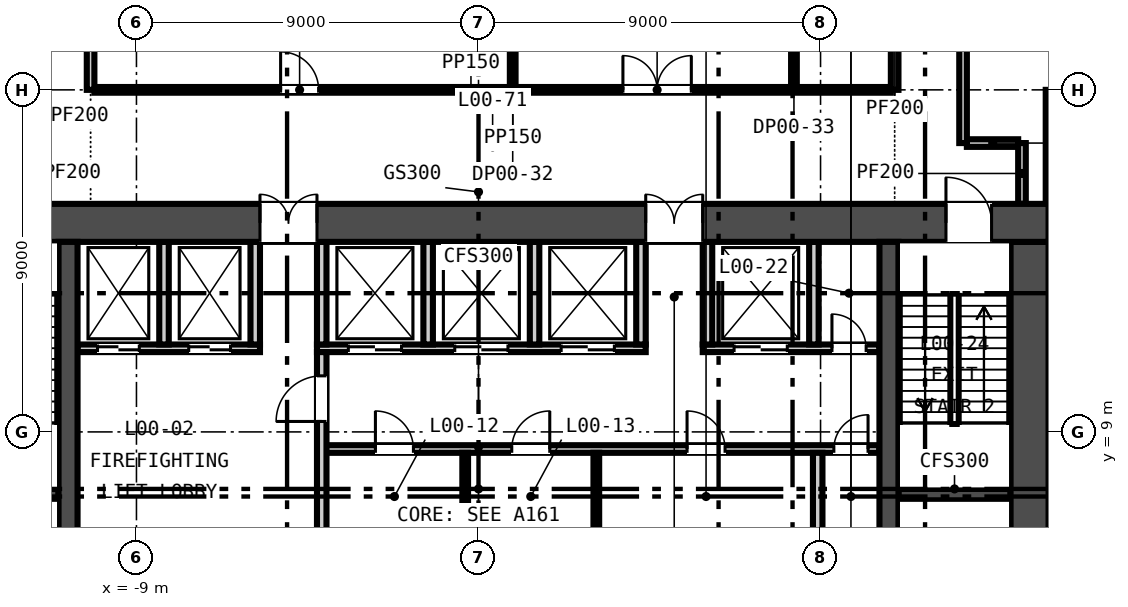
"""IFC4 building model, lengths in metres.
Left out: names, types, materials, properties, quantities, classifications, styles, units other than length and angle.
Written with IfcOpenShell. Run it as: python <this file> out.ifc"""

import sys

from ifc_helpers import new_model, si_unit, direction, frame, frame_2d, origin, place, context, subcontext, project, spatial, rectangle, extrude, element, fill, save


model = new_model("IFC4")
c1 = context("Model", 3, precision=1e-05, world=origin(), true_north=direction((0.0, 1.0)))
c2 = subcontext(c1, "Body", "Model", "MODEL_VIEW")
j1 = project(units=[si_unit("LENGTHUNIT", "METRE"), si_unit("PLANEANGLEUNIT", "RADIAN")], contexts=[c1])
p1 = place(None, origin())
s1 = spatial("IfcSite", under=j1, at=p1, CompositionType="ELEMENT")
p2 = place(p1, origin())
s2 = spatial("IfcBuilding", under=s1, at=p2, CompositionType="ELEMENT")
p3 = place(p2, origin())
s3 = spatial("IfcBuildingStorey", under=s2, at=p3, CompositionType="ELEMENT", Elevation=0.0)
p4 = place(p3, frame((-15.0, 14.5, -2.2), z_axis=(0.0, 0.0, 1.0), x_axis=(1.0, 0.0, 0.0)))
e1 = element("IfcWall", 1, at=p4, inside=s3, PredefinedType="SOLIDWALL", context=c2, shape_type="SweptSolid", body=[
    extrude(rectangle(XDim=30.0, YDim=1.0, at=frame_2d((15.0, 0.0))), origin(), (0.0, 0.0, 1.0), 10.8),
])
p5 = place(p4, frame((9.25, 0.0, 2.2)))
e2 = element("IfcOpeningElement", 2, at=p5, cuts=e1, PredefinedType="OPENING", context=c2, shape_type="SweptSolid", body=[
    extrude(rectangle(XDim=1.5, YDim=2.1, at=frame_2d((0.75, 1.05))), frame((0.0, 0.51, 0.0), z_axis=(0.0, -1.0, 0.0), x_axis=(1.0, 0.0, 0.0)), (0.0, 0.0, 1.0), 1.02),
])
p6 = place(p4, frame((19.4, 0.0, 2.2)))
e3 = element("IfcOpeningElement", 3, at=p6, cuts=e1, PredefinedType="OPENING", context=c2, shape_type="SweptSolid", body=[
    extrude(rectangle(XDim=1.5, YDim=2.1, at=frame_2d((0.75, 1.05))), frame((0.0, 0.51, 0.0), z_axis=(0.0, -1.0, 0.0), x_axis=(1.0, 0.0, 0.0)), (0.0, 0.0, 1.0), 1.02),
])
p7 = place(p4, frame((1.5, 0.0, 2.2)))
e4 = element("IfcOpeningElement", 4, at=p7, cuts=e1, PredefinedType="OPENING", context=c2, shape_type="SweptSolid", body=[
    extrude(rectangle(XDim=1.2, YDim=2.1, at=frame_2d((0.6, 1.05))), frame((0.0, 0.51, 0.0), z_axis=(0.0, -1.0, 0.0), x_axis=(1.0, 0.0, 0.0)), (0.0, 0.0, 1.0), 1.02),
])
p8 = place(p4, frame((27.3, 0.0, 2.2)))
e5 = element("IfcOpeningElement", 5, at=p8, cuts=e1, PredefinedType="OPENING", context=c2, shape_type="SweptSolid", body=[
    extrude(rectangle(XDim=1.2, YDim=2.1, at=frame_2d((0.6, 1.05))), frame((0.0, 0.51, 0.0), z_axis=(0.0, -1.0, 0.0), x_axis=(1.0, 0.0, 0.0)), (0.0, 0.0, 1.0), 1.02),
])
p9 = place(p3, frame((14.5, 1.0, -2.2), z_axis=(0.0, 0.0, 1.0), x_axis=(0.0, 1.0, 0.0)))
e6 = element("IfcWall", 6, at=p9, inside=s3, PredefinedType="SOLIDWALL", context=c2, shape_type="SweptSolid", body=[
    extrude(rectangle(XDim=13.0, YDim=1.0, at=frame_2d((6.5, 0.0))), origin(), (0.0, 0.0, 1.0), 10.8),
])
for number, where, z_axis, x_axis in (
    (7, (-10.8, 1.0, -2.2), (0.0, 0.0, 1.0), (0.0, 1.0, 0.0)),
    (8, (10.8, 1.0, -2.2), (0.0, 0.0, 1.0), (0.0, 1.0, 0.0)),
):
    element("IfcWall", number, at=place(p3, frame(where, z_axis=z_axis, x_axis=x_axis)), inside=s3, PredefinedType="SOLIDWALL", context=c2, shape_type="SweptSolid", body=[
        extrude(rectangle(XDim=13.0, YDim=0.5, at=frame_2d((6.5, 0.0))), origin(), (0.0, 0.0, 1.0), 10.8),
    ])
p10 = place(p3, frame((-4.125, 8.55, 0.0), z_axis=(0.0, 0.0, 1.0), x_axis=(1.0, 0.0, 0.0)))
e9 = element("IfcWall", 9, at=p10, inside=s3, PredefinedType="PARTITIONING", context=c2, shape_type="SweptSolid", body=[
    extrude(rectangle(XDim=14.675, YDim=0.2, at=frame_2d((7.337, 0.0))), origin(), (0.0, 0.0, 1.0), 8.6),
])
p11 = place(p10, frame((1.413, 0.0, 0.0)))
e10 = element("IfcOpeningElement", 10, at=p11, cuts=e9, PredefinedType="OPENING", context=c2, shape_type="SweptSolid", body=[
    extrude(rectangle(XDim=1.0, YDim=2.1, at=frame_2d((0.5, 1.05))), frame((0.0, 0.11, 0.0), z_axis=(0.0, -1.0, 0.0), x_axis=(1.0, 0.0, 0.0)), (0.0, 0.0, 1.0), 0.22),
])
p12 = place(p10, frame((5.0, 0.0, 0.0)))
e11 = element("IfcOpeningElement", 11, at=p12, cuts=e9, PredefinedType="OPENING", context=c2, shape_type="SweptSolid", body=[
    extrude(rectangle(XDim=1.0, YDim=2.1, at=frame_2d((0.5, 1.05))), frame((0.0, 0.11, 0.0), z_axis=(0.0, -1.0, 0.0), x_axis=(1.0, 0.0, 0.0)), (0.0, 0.0, 1.0), 0.22),
])
p13 = place(p10, frame((9.613, 0.0, 0.0)))
e12 = element("IfcOpeningElement", 12, at=p13, cuts=e9, PredefinedType="OPENING", context=c2, shape_type="SweptSolid", body=[
    extrude(rectangle(XDim=1.0, YDim=2.1, at=frame_2d((0.5, 1.05))), frame((0.0, 0.11, 0.0), z_axis=(0.0, -1.0, 0.0), x_axis=(1.0, 0.0, 0.0)), (0.0, 0.0, 1.0), 0.22),
])
p14 = place(p10, frame((13.475, 0.0, 0.0)))
e13 = element("IfcOpeningElement", 13, at=p14, cuts=e9, PredefinedType="OPENING", context=c2, shape_type="SweptSolid", body=[
    extrude(rectangle(XDim=0.9, YDim=2.1, at=frame_2d((0.45, 1.05))), frame((0.0, 0.11, 0.0), z_axis=(0.0, -1.0, 0.0), x_axis=(1.0, 0.0, 0.0)), (0.0, 0.0, 1.0), 0.22),
])
p15 = place(p3, frame((-10.55, 11.2, 0.0), z_axis=(0.0, 0.0, 1.0), x_axis=(1.0, 0.0, 0.0)))
e14 = element("IfcWall", 14, at=p15, inside=s3, PredefinedType="PARTITIONING", context=c2, shape_type="SweptSolid", body=[
    extrude(rectangle(XDim=4.8, YDim=0.2, at=frame_2d((2.4, 0.0))), origin(), (0.0, 0.0, 1.0), 8.6),
])
p16 = place(p15, frame((0.525, 0.0, 0.0)))
e15 = element("IfcOpeningElement", 15, at=p16, cuts=e14, PredefinedType="OPENING", context=c2, shape_type="SweptSolid", body=[
    extrude(rectangle(XDim=1.1, YDim=2.1, at=frame_2d((0.55, 1.05))), frame((0.0, 0.11, 0.0), z_axis=(0.0, -1.0, 0.0), x_axis=(1.0, 0.0, 0.0)), (0.0, 0.0, 1.0), 0.22),
])
p17 = place(p15, frame((2.925, 0.0, 0.0)))
e16 = element("IfcOpeningElement", 16, at=p17, cuts=e14, PredefinedType="OPENING", context=c2, shape_type="SweptSolid", body=[
    extrude(rectangle(XDim=1.1, YDim=2.1, at=frame_2d((0.55, 1.05))), frame((0.0, 0.11, 0.0), z_axis=(0.0, -1.0, 0.0), x_axis=(1.0, 0.0, 0.0)), (0.0, 0.0, 1.0), 0.22),
])
p18 = place(p3, frame((-4.25, 11.2, 0.0), z_axis=(0.0, 0.0, 1.0), x_axis=(1.0, 0.0, 0.0)))
e17 = element("IfcWall", 17, at=p18, inside=s3, PredefinedType="PARTITIONING", context=c2, shape_type="SweptSolid", body=[
    extrude(rectangle(XDim=8.65, YDim=0.2, at=frame_2d((4.325, 0.0))), origin(), (0.0, 0.0, 1.0), 8.6),
])
p19 = place(p18, frame((0.825, 0.0, 0.0)))
e18 = element("IfcOpeningElement", 18, at=p19, cuts=e17, PredefinedType="OPENING", context=c2, shape_type="SweptSolid", body=[
    extrude(rectangle(XDim=1.4, YDim=2.1, at=frame_2d((0.7, 1.05))), frame((0.0, 0.11, 0.0), z_axis=(0.0, -1.0, 0.0), x_axis=(1.0, 0.0, 0.0)), (0.0, 0.0, 1.0), 0.22),
])
p20 = place(p18, frame((3.625, 0.0, 0.0)))
e19 = element("IfcOpeningElement", 19, at=p20, cuts=e17, PredefinedType="OPENING", context=c2, shape_type="SweptSolid", body=[
    extrude(rectangle(XDim=1.4, YDim=2.1, at=frame_2d((0.7, 1.05))), frame((0.0, 0.11, 0.0), z_axis=(0.0, -1.0, 0.0), x_axis=(1.0, 0.0, 0.0)), (0.0, 0.0, 1.0), 0.22),
])
p21 = place(p18, frame((6.425, 0.0, 0.0)))
e20 = element("IfcOpeningElement", 20, at=p21, cuts=e17, PredefinedType="OPENING", context=c2, shape_type="SweptSolid", body=[
    extrude(rectangle(XDim=1.4, YDim=2.1, at=frame_2d((0.7, 1.05))), frame((0.0, 0.11, 0.0), z_axis=(0.0, -1.0, 0.0), x_axis=(1.0, 0.0, 0.0)), (0.0, 0.0, 1.0), 0.22),
])
p22 = place(p3, frame((5.9, 11.2, 0.0), z_axis=(0.0, 0.0, 1.0), x_axis=(1.0, 0.0, 0.0)))
e21 = element("IfcWall", 21, at=p22, inside=s3, PredefinedType="PARTITIONING", context=c2, shape_type="SweptSolid", body=[
    extrude(rectangle(XDim=4.65, YDim=0.2, at=frame_2d((2.325, 0.0))), origin(), (0.0, 0.0, 1.0), 8.6),
])
p23 = place(p22, frame((0.825, 0.0, 0.0)))
e22 = element("IfcOpeningElement", 22, at=p23, cuts=e21, PredefinedType="OPENING", context=c2, shape_type="SweptSolid", body=[
    extrude(rectangle(XDim=1.4, YDim=2.1, at=frame_2d((0.7, 1.05))), frame((0.0, 0.11, 0.0), z_axis=(0.0, -1.0, 0.0), x_axis=(1.0, 0.0, 0.0)), (0.0, 0.0, 1.0), 0.22),
])
p24 = place(p22, frame((3.4, 0.0, 0.0)))
e23 = element("IfcOpeningElement", 23, at=p24, cuts=e21, PredefinedType="OPENING", context=c2, shape_type="SweptSolid", body=[
    extrude(rectangle(XDim=0.9, YDim=2.1, at=frame_2d((0.45, 1.05))), frame((0.0, 0.11, 0.0), z_axis=(0.0, -1.0, 0.0), x_axis=(1.0, 0.0, 0.0)), (0.0, 0.0, 1.0), 0.22),
])
p25 = place(p3, frame((-4.125, 6.15, 0.0), z_axis=(0.0, 0.0, 1.0), x_axis=(0.0, 1.0, 0.0)))
e24 = element("IfcWall", 24, at=p25, inside=s3, PredefinedType="PARTITIONING", context=c2, shape_type="SweptSolid", body=[
    extrude(rectangle(XDim=4.95, YDim=0.25, at=frame_2d((2.475, 0.0))), origin(), (0.0, 0.0, 1.0), 8.6),
])
p26 = place(p25, frame((3.125, 0.0, 0.0)))
e25 = element("IfcOpeningElement", 25, at=p26, cuts=e24, PredefinedType="OPENING", context=c2, shape_type="SweptSolid", body=[
    extrude(rectangle(XDim=1.2, YDim=2.1, at=frame_2d((0.6, 1.05))), frame((0.0, 0.135, 0.0), z_axis=(0.0, -1.0, 0.0), x_axis=(1.0, 0.0, 0.0)), (0.0, 0.0, 1.0), 0.27),
])
for number, where, z_axis, x_axis in (
    (26, (-0.35, 6.15, 0.0), (0.0, 0.0, 1.0), (0.0, 1.0, 0.0)),
    (27, (3.1, 6.15, 0.0), (0.0, 0.0, 1.0), (0.0, 1.0, 0.0)),
):
    element("IfcWall", number, at=place(p3, frame(where, z_axis=z_axis, x_axis=x_axis)), inside=s3, PredefinedType="PARTITIONING", context=c2, shape_type="SweptSolid", body=[
        extrude(rectangle(XDim=2.3, YDim=0.15, at=frame_2d((1.15, 0.0))), origin(), (0.0, 0.0, 1.0), 8.6),
    ])
p27 = place(p3, frame((8.925, 6.15, 0.0), z_axis=(0.0, 0.0, 1.0), x_axis=(0.0, 1.0, 0.0)))
e28 = element("IfcWall", 28, at=p27, inside=s3, PredefinedType="PARTITIONING", context=c2, shape_type="SweptSolid", body=[
    extrude(rectangle(XDim=2.3, YDim=0.25, at=frame_2d((1.15, 0.0))), origin(), (0.0, 0.0, 1.0), 8.6),
])
for number, where, z_axis, x_axis in (
    (29, (-8.275, 11.3, 0.0), (0.0, 0.0, 1.0), (0.0, 1.0, 0.0)),
    (30, (-5.875, 11.3, 0.0), (0.0, 0.0, 1.0), (0.0, 1.0, 0.0)),
    (31, (-4.125, 11.3, 0.0), (0.0, 0.0, 1.0), (0.0, 1.0, 0.0)),
    (32, (-1.325, 11.3, 0.0), (0.0, 0.0, 1.0), (0.0, 1.0, 0.0)),
    (33, (1.475, 11.3, 0.0), (0.0, 0.0, 1.0), (0.0, 1.0, 0.0)),
    (34, (4.275, 11.3, 0.0), (0.0, 0.0, 1.0), (0.0, 1.0, 0.0)),
    (35, (6.025, 11.3, 0.0), (0.0, 0.0, 1.0), (0.0, 1.0, 0.0)),
    (36, (8.825, 11.3, 0.0), (0.0, 0.0, 1.0), (0.0, 1.0, 0.0)),
):
    element("IfcWall", number, at=place(p3, frame(where, z_axis=z_axis, x_axis=x_axis)), inside=s3, PredefinedType="PARTITIONING", context=c2, shape_type="SweptSolid", body=[
        extrude(rectangle(XDim=2.7, YDim=0.25, at=frame_2d((1.35, 0.0))), origin(), (0.0, 0.0, 1.0), 8.6),
    ])
for number, where, z_axis, x_axis in (
    (37, (-14.0, 7.35, 0.0), (0.0, 0.0, 1.0), (1.0, 0.0, 0.0)),
    (38, (11.05, 7.35, 0.0), (0.0, 0.0, 1.0), (1.0, 0.0, 0.0)),
):
    element("IfcWall", number, at=place(p3, frame(where, z_axis=z_axis, x_axis=x_axis)), inside=s3, PredefinedType="SOLIDWALL", context=c2, shape_type="SweptSolid", body=[
        extrude(rectangle(XDim=2.95, YDim=0.3, at=frame_2d((1.475, 0.0))), origin(), (0.0, 0.0, 1.0), 8.6),
    ])
p28 = place(p3, frame((12.85, 16.6, 0.0), z_axis=(0.0, 0.0, 1.0), x_axis=(1.0, 0.0, 0.0)))
e39 = element("IfcWall", 39, at=p28, inside=s3, PredefinedType="PARTITIONING", context=c2, shape_type="SweptSolid", body=[
    extrude(rectangle(XDim=1.35, YDim=0.2, at=frame_2d((0.675, 0.0))), origin(), (0.0, 0.0, 1.0), 8.6),
])
p29 = place(p3, frame((-10.107, 18.0, 0.0), z_axis=(0.0, 0.0, 1.0), x_axis=(1.0, 0.0, 0.0)))
e40 = element("IfcWall", 40, at=p29, inside=s3, PredefinedType="PARTITIONING", context=c2, shape_type="SweptSolid", body=[
    extrude(rectangle(XDim=20.957, YDim=0.15, at=frame_2d((10.479, 0.0))), origin(), (0.0, 0.0, 1.0), 8.6),
])
p30 = place(p29, frame((13.907, 0.0, 0.0)))
e41 = element("IfcOpeningElement", 41, at=p30, cuts=e40, PredefinedType="OPENING", context=c2, shape_type="SweptSolid", body=[
    extrude(rectangle(XDim=1.8, YDim=2.4, at=frame_2d((0.9, 1.2))), frame((0.0, 0.085, 0.0), z_axis=(0.0, -1.0, 0.0), x_axis=(1.0, 0.0, 0.0)), (0.0, 0.0, 1.0), 0.17),
])
p31 = place(p29, frame((4.9, 0.0, 0.0)))
e42 = element("IfcOpeningElement", 42, at=p31, cuts=e40, PredefinedType="OPENING", context=c2, shape_type="SweptSolid", body=[
    extrude(rectangle(XDim=1.0, YDim=2.1, at=frame_2d((0.5, 1.05))), frame((0.0, 0.085, 0.0), z_axis=(0.0, -1.0, 0.0), x_axis=(1.0, 0.0, 0.0)), (0.0, 0.0, 1.0), 0.17),
])
p32 = place(p3, frame((-10.207, 18.0, 0.0), z_axis=(0.0, 0.0, 1.0), x_axis=(0.0, 1.0, 0.0)))
e43 = element("IfcWall", 43, at=p32, inside=s3, PredefinedType="PARTITIONING", context=c2, shape_type="SweptSolid", body=[
    extrude(rectangle(XDim=13.1, YDim=0.2, at=frame_2d((6.55, 0.0))), origin(), (0.0, 0.0, 1.0), 8.6),
])
p33 = place(p3, frame((0.9, 18.075, 0.0), z_axis=(0.0, 0.0, 1.0), x_axis=(0.0, 1.0, 0.0)))
e44 = element("IfcWall", 44, at=p33, inside=s3, PredefinedType="PARTITIONING", context=c2, shape_type="SweptSolid", body=[
    extrude(rectangle(XDim=10.925, YDim=0.15, at=frame_2d((5.462, 0.0))), origin(), (0.0, 0.0, 1.0), 8.6),
])
p34 = place(p3, frame((8.3, 18.075, 0.0), z_axis=(0.0, 0.0, 1.0), x_axis=(0.0, 1.0, 0.0)))
e45 = element("IfcWall", 45, at=p34, inside=s3, PredefinedType="PARTITIONING", context=c2, shape_type="SweptSolid", body=[
    extrude(rectangle(XDim=13.025, YDim=0.15, at=frame_2d((6.513, 0.0))), origin(), (0.0, 0.0, 1.0), 8.6),
])
p35 = place(p3, frame((10.95, 18.0, 0.0), z_axis=(0.0, 0.0, 1.0), x_axis=(0.0, 1.0, 0.0)))
e46 = element("IfcWall", 46, at=p35, inside=s3, PredefinedType="PARTITIONING", context=c2, shape_type="SweptSolid", body=[
    extrude(rectangle(XDim=8.973, YDim=0.2, at=frame_2d((4.486, 0.0))), origin(), (0.0, 0.0, 1.0), 7.921),
])
p36 = place(p3, frame((12.75, 16.6, 0.0), z_axis=(0.0, 0.0, 1.0), x_axis=(0.0, 1.0, 0.0)))
e47 = element("IfcWall", 47, at=p36, inside=s3, PredefinedType="PARTITIONING", context=c2, shape_type="SweptSolid", body=[
    extrude(rectangle(XDim=9.65, YDim=0.2, at=frame_2d((4.825, 0.0))), origin(), (0.0, 0.0, 1.0), 8.6),
])
p37 = place(p3, frame((14.3, 15.0, 0.0), z_axis=(0.0, 0.0, 1.0), x_axis=(0.0, 1.0, 0.0)))
e48 = element("IfcWall", 48, at=p37, inside=s3, PredefinedType="PARTITIONING", context=c2, shape_type="SweptSolid", body=[
    extrude(rectangle(XDim=1.6, YDim=0.2, at=frame_2d((0.8, 0.0))), origin(), (0.0, 0.0, 1.0), 8.6),
])
p38 = place(p3, frame((15.0, 15.0, 0.0), z_axis=(0.0, 0.0, 1.0), x_axis=(0.0, 1.0, 0.0)))
e49 = element("IfcWall", 49, at=p38, inside=s3, PredefinedType="PARTITIONING", context=c2, shape_type="SweptSolid", body=[
    extrude(rectangle(XDim=3.0, YDim=0.15, at=frame_2d((1.5, 0.0))), origin(), (0.0, 0.0, 1.0), 8.6),
])
p39 = place(p26, origin())
e50 = element("IfcDoor", 50, at=p39, inside=s3, OperationType="SINGLE_SWING_LEFT", PredefinedType="DOOR", context=c2, shape_type="SweptSolid", body=[
    extrude(rectangle(XDim=1.2, YDim=2.1, at=frame_2d((0.6, 1.05))), frame((0.0, 0.025, 0.0), z_axis=(0.0, -1.0, 0.0), x_axis=(1.0, 0.0, 0.0)), (0.0, 0.0, 1.0), 0.05),
])
fill(e25, e50)
p40 = place(p11, origin())
e51 = element("IfcDoor", 51, at=p40, inside=s3, OperationType="SINGLE_SWING_LEFT", PredefinedType="DOOR", context=c2, shape_type="SweptSolid", body=[
    extrude(rectangle(XDim=1.0, YDim=2.1, at=frame_2d((0.5, 1.05))), frame((0.0, 0.025, 0.0), z_axis=(0.0, -1.0, 0.0), x_axis=(1.0, 0.0, 0.0)), (0.0, 0.0, 1.0), 0.05),
])
fill(e10, e51)
p41 = place(p12, origin())
e52 = element("IfcDoor", 52, at=p41, inside=s3, OperationType="SINGLE_SWING_RIGHT", PredefinedType="DOOR", context=c2, shape_type="SweptSolid", body=[
    extrude(rectangle(XDim=1.0, YDim=2.1, at=frame_2d((0.5, 1.05))), frame((0.0, 0.025, 0.0), z_axis=(0.0, -1.0, 0.0), x_axis=(1.0, 0.0, 0.0)), (0.0, 0.0, 1.0), 0.05),
])
fill(e11, e52)
p42 = place(p13, origin())
e53 = element("IfcDoor", 53, at=p42, inside=s3, OperationType="SINGLE_SWING_LEFT", PredefinedType="DOOR", context=c2, shape_type="SweptSolid", body=[
    extrude(rectangle(XDim=1.0, YDim=2.1, at=frame_2d((0.5, 1.05))), frame((0.0, 0.025, 0.0), z_axis=(0.0, -1.0, 0.0), x_axis=(1.0, 0.0, 0.0)), (0.0, 0.0, 1.0), 0.05),
])
fill(e12, e53)
p43 = place(p14, origin())
e54 = element("IfcDoor", 54, at=p43, inside=s3, OperationType="SINGLE_SWING_RIGHT", PredefinedType="DOOR", context=c2, shape_type="SweptSolid", body=[
    extrude(rectangle(XDim=0.9, YDim=2.1, at=frame_2d((0.45, 1.05))), frame((0.0, 0.025, 0.0), z_axis=(0.0, -1.0, 0.0), x_axis=(1.0, 0.0, 0.0)), (0.0, 0.0, 1.0), 0.05),
])
fill(e13, e54)
p44 = place(p16, origin())
e55 = element("IfcDoor", 55, at=p44, inside=s3, OperationType="DOUBLE_DOOR_SLIDING", PredefinedType="DOOR", context=c2, shape_type="SweptSolid", body=[
    extrude(rectangle(XDim=1.1, YDim=2.1, at=frame_2d((0.55, 1.05))), frame((0.0, 0.025, 0.0), z_axis=(0.0, -1.0, 0.0), x_axis=(1.0, 0.0, 0.0)), (0.0, 0.0, 1.0), 0.05),
])
fill(e15, e55)
p45 = place(p17, origin())
e56 = element("IfcDoor", 56, at=p45, inside=s3, OperationType="DOUBLE_DOOR_SLIDING", PredefinedType="DOOR", context=c2, shape_type="SweptSolid", body=[
    extrude(rectangle(XDim=1.1, YDim=2.1, at=frame_2d((0.55, 1.05))), frame((0.0, 0.025, 0.0), z_axis=(0.0, -1.0, 0.0), x_axis=(1.0, 0.0, 0.0)), (0.0, 0.0, 1.0), 0.05),
])
fill(e16, e56)
p46 = place(p19, origin())
e57 = element("IfcDoor", 57, at=p46, inside=s3, OperationType="DOUBLE_DOOR_SLIDING", PredefinedType="DOOR", context=c2, shape_type="SweptSolid", body=[
    extrude(rectangle(XDim=1.4, YDim=2.1, at=frame_2d((0.7, 1.05))), frame((0.0, 0.025, 0.0), z_axis=(0.0, -1.0, 0.0), x_axis=(1.0, 0.0, 0.0)), (0.0, 0.0, 1.0), 0.05),
])
fill(e18, e57)
p47 = place(p20, origin())
e58 = element("IfcDoor", 58, at=p47, inside=s3, OperationType="DOUBLE_DOOR_SLIDING", PredefinedType="DOOR", context=c2, shape_type="SweptSolid", body=[
    extrude(rectangle(XDim=1.4, YDim=2.1, at=frame_2d((0.7, 1.05))), frame((0.0, 0.025, 0.0), z_axis=(0.0, -1.0, 0.0), x_axis=(1.0, 0.0, 0.0)), (0.0, 0.0, 1.0), 0.05),
])
fill(e19, e58)
p48 = place(p21, origin())
e59 = element("IfcDoor", 59, at=p48, inside=s3, OperationType="DOUBLE_DOOR_SLIDING", PredefinedType="DOOR", context=c2, shape_type="SweptSolid", body=[
    extrude(rectangle(XDim=1.4, YDim=2.1, at=frame_2d((0.7, 1.05))), frame((0.0, 0.025, 0.0), z_axis=(0.0, -1.0, 0.0), x_axis=(1.0, 0.0, 0.0)), (0.0, 0.0, 1.0), 0.05),
])
fill(e20, e59)
p49 = place(p23, origin())
e60 = element("IfcDoor", 60, at=p49, inside=s3, OperationType="DOUBLE_DOOR_SLIDING", PredefinedType="DOOR", context=c2, shape_type="SweptSolid", body=[
    extrude(rectangle(XDim=1.4, YDim=2.1, at=frame_2d((0.7, 1.05))), frame((0.0, 0.025, 0.0), z_axis=(0.0, -1.0, 0.0), x_axis=(1.0, 0.0, 0.0)), (0.0, 0.0, 1.0), 0.05),
])
fill(e22, e60)
p50 = place(p24, origin())
e61 = element("IfcDoor", 61, at=p50, inside=s3, OperationType="SINGLE_SWING_LEFT", PredefinedType="DOOR", context=c2, shape_type="SweptSolid", body=[
    extrude(rectangle(XDim=0.9, YDim=2.1, at=frame_2d((0.45, 1.05))), frame((0.0, 0.025, 0.0), z_axis=(0.0, -1.0, 0.0), x_axis=(1.0, 0.0, 0.0)), (0.0, 0.0, 1.0), 0.05),
])
fill(e23, e61)
p51 = place(p5, origin())
e62 = element("IfcDoor", 62, at=p51, inside=s3, OperationType="DOUBLE_DOOR_SINGLE_SWING", PredefinedType="DOOR", context=c2, shape_type="SweptSolid", body=[
    extrude(rectangle(XDim=1.5, YDim=2.1, at=frame_2d((0.75, 1.05))), frame((0.0, 0.025, 0.0), z_axis=(0.0, -1.0, 0.0), x_axis=(1.0, 0.0, 0.0)), (0.0, 0.0, 1.0), 0.05),
])
fill(e2, e62)
p52 = place(p6, origin())
e63 = element("IfcDoor", 63, at=p52, inside=s3, OperationType="DOUBLE_DOOR_SINGLE_SWING", PredefinedType="DOOR", context=c2, shape_type="SweptSolid", body=[
    extrude(rectangle(XDim=1.5, YDim=2.1, at=frame_2d((0.75, 1.05))), frame((0.0, 0.025, 0.0), z_axis=(0.0, -1.0, 0.0), x_axis=(1.0, 0.0, 0.0)), (0.0, 0.0, 1.0), 0.05),
])
fill(e3, e63)
p53 = place(p8, origin())
e64 = element("IfcDoor", 64, at=p53, inside=s3, OperationType="SINGLE_SWING_LEFT", PredefinedType="DOOR", context=c2, shape_type="SweptSolid", body=[
    extrude(rectangle(XDim=1.2, YDim=2.1, at=frame_2d((0.6, 1.05))), frame((0.0, 0.025, 0.0), z_axis=(0.0, -1.0, 0.0), x_axis=(1.0, 0.0, 0.0)), (0.0, 0.0, 1.0), 0.05),
])
fill(e5, e64)
p54 = place(p30, origin())
e65 = element("IfcDoor", 65, at=p54, inside=s3, OperationType="SINGLE_SWING_LEFT", PredefinedType="DOOR", context=c2, shape_type="SweptSolid", body=[
    extrude(rectangle(XDim=1.8, YDim=2.4, at=frame_2d((0.9, 1.2))), frame((0.0, 0.025, 0.0), z_axis=(0.0, -1.0, 0.0), x_axis=(1.0, 0.0, 0.0)), (0.0, 0.0, 1.0), 0.05),
])
fill(e41, e65)
p55 = place(p31, origin())
e66 = element("IfcDoor", 66, at=p55, inside=s3, OperationType="SINGLE_SWING_LEFT", PredefinedType="DOOR", context=c2, shape_type="SweptSolid", body=[
    extrude(rectangle(XDim=1.0, YDim=2.1, at=frame_2d((0.5, 1.05))), frame((0.0, 0.025, 0.0), z_axis=(0.0, -1.0, 0.0), x_axis=(1.0, 0.0, 0.0)), (0.0, 0.0, 1.0), 0.05),
])
fill(e42, e66)
save(model, sys.argv[1])
